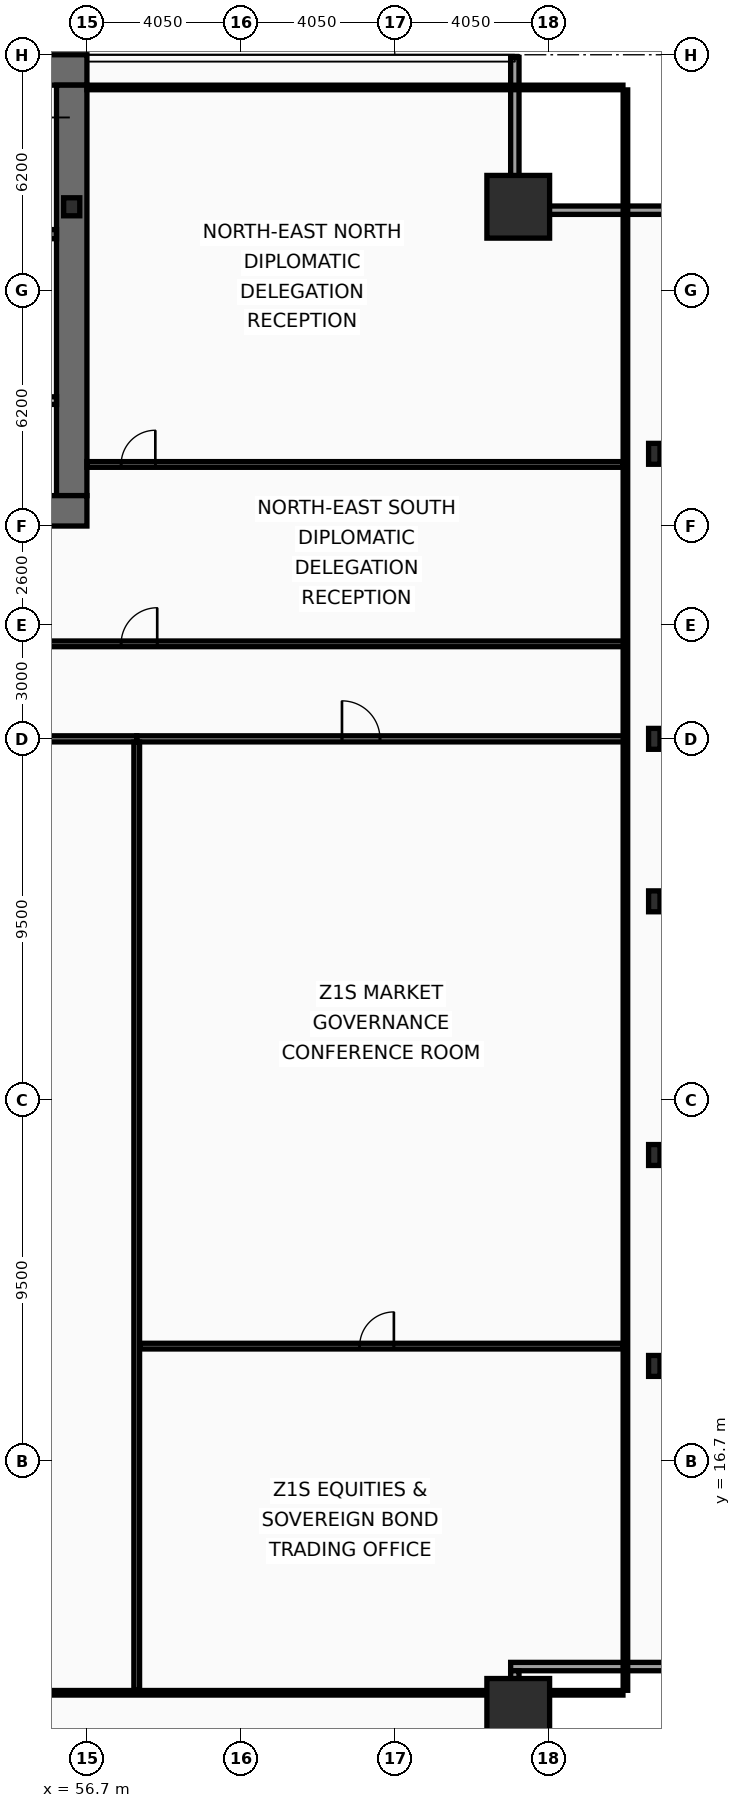
"""IFC4 building model, lengths in metres.
Left out: names, types, materials, properties, quantities, classifications, styles, units other than length and angle.
Written with IfcOpenShell. Run it as: python <this file> out.ifc"""

import sys

from ifc_helpers import new_model, si_unit, direction, frame, frame_2d, origin, origin_2d, place, context, subcontext, project, spatial, rectangle, hollow_rectangle, i_section, extrude, element, fill, save


model = new_model("IFC4")
c1 = context("Model", 3, precision=1e-05, world=origin(), true_north=direction((0.0, 1.0)))
c2 = subcontext(c1, "Body", "Model", "MODEL_VIEW")
j1 = project(units=[si_unit("LENGTHUNIT", "METRE"), si_unit("PLANEANGLEUNIT", "RADIAN")], contexts=[c1])
p1 = place(None, origin())
s1 = spatial("IfcSite", under=j1, at=p1, CompositionType="ELEMENT")
p2 = place(p1, origin())
s2 = spatial("IfcBuilding", under=s1, at=p2, CompositionType="ELEMENT")
p3 = place(p2, frame((0.0, 0.0, 77.8)))
s3 = spatial("IfcBuildingStorey", under=s2, at=p3, CompositionType="ELEMENT", Elevation=77.8)
p4 = place(p3, frame((16.2, 53.3, 0.0), z_axis=(0.0, 0.0, 1.0), x_axis=(1.0, 0.0, 0.0)))
e1 = element("IfcWall", 1, at=p4, inside=s3, PredefinedType="SHEAR", context=c2, shape_type="SweptSolid", body=[
    extrude(rectangle(XDim=40.5, YDim=0.8, at=frame_2d((20.25, 0.0))), origin(), (0.0, 0.0, 1.0), 3.82),
])
p5 = place(p3, frame((56.3, 52.9, 0.0), z_axis=(0.0, 0.0, 1.0), x_axis=(0.0, -1.0, 0.0)))
e2 = element("IfcWall", 2, at=p5, inside=s3, PredefinedType="SHEAR", context=c2, shape_type="SweptSolid", body=[
    extrude(rectangle(XDim=10.8, YDim=0.8, at=frame_2d((5.4, 0.0))), origin(), (0.0, 0.0, 1.0), 3.82),
])
p6 = place(p3, frame((56.7, 41.7, 0.0), z_axis=(0.0, 0.0, 1.0), x_axis=(-1.0, 0.0, 0.0)))
e3 = element("IfcWall", 3, at=p6, inside=s3, PredefinedType="SHEAR", context=c2, shape_type="SweptSolid", body=[
    extrude(rectangle(XDim=2.45, YDim=0.8, at=frame_2d((1.225, 0.0))), origin(), (0.0, 0.0, 1.0), 3.82),
])
p7 = place(p3, frame((48.63, 48.98, 0.0), z_axis=(0.0, 0.0, 1.0), x_axis=(1.0, 0.0, 0.0)))
e4 = element("IfcWall", 4, at=p7, inside=s3, PredefinedType="SHEAR", context=c2, shape_type="SweptSolid", body=[
    extrude(rectangle(XDim=7.27, YDim=0.24, at=frame_2d((3.635, 0.0))), origin(), (0.0, 0.0, 1.0), 3.82),
])
p8 = place(p7, frame((6.0, 0.0, 0.0)))
e5 = element("IfcOpeningElement", 5, at=p8, cuts=e4, PredefinedType="OPENING", context=c2, shape_type="SweptSolid", body=[
    extrude(rectangle(XDim=1.05, YDim=2.15, at=frame_2d((0.525, 1.075))), frame((0.0, 0.13, 0.0), z_axis=(0.0, -1.0, 0.0), x_axis=(1.0, 0.0, 0.0)), (0.0, 0.0, 1.0), 0.26),
])
for number, where, z_axis, x_axis in (
    (6, (68.05, 10.15, 0.0), (0.0, 0.0, 1.0), (1.0, 0.0, 0.0)),
    (7, (68.05, 49.7, 0.0), (0.0, 0.0, 1.0), (1.0, 0.0, 0.0)),
):
    element("IfcColumn", number, at=place(p3, frame(where, z_axis=z_axis, x_axis=x_axis)), inside=s3, PredefinedType="COLUMN", context=c2, shape_type="SweptSolid", body=[
        extrude(hollow_rectangle(XDim=1.65, YDim=1.65, WallThickness=0.075, at=origin_2d()), origin(), (0.0, 0.0, 1.0), 4.0),
    ])
for number, where, z_axis, x_axis in (
    (8, (71.63, 19.2, 0.0), (0.0, 0.0, 1.0), (1.0, 0.0, 0.0)),
    (9, (71.63, 24.75, 0.0), (0.0, 0.0, 1.0), (1.0, 0.0, 0.0)),
    (10, (71.63, 31.425, 0.0), (0.0, 0.0, 1.0), (1.0, 0.0, 0.0)),
    (11, (71.63, 35.7, 0.0), (0.0, 0.0, 1.0), (1.0, 0.0, 0.0)),
    (12, (71.63, 43.2, 0.0), (0.0, 0.0, 1.0), (1.0, 0.0, 0.0)),
):
    element("IfcColumn", number, at=place(p3, frame(where, z_axis=z_axis, x_axis=x_axis)), inside=s3, PredefinedType="COLUMN", context=c2, shape_type="SweptSolid", body=[
        extrude(i_section(OverallWidth=0.3, OverallDepth=0.55, WebThickness=0.015, FlangeThickness=0.029, at=origin_2d()), origin(), (0.0, 0.0, 1.0), 4.0),
    ])
p9 = place(p3, frame((56.3, 49.7, 0.0), z_axis=(0.0, 0.0, 1.0), x_axis=(1.0, 0.0, 0.0)))
e13 = element("IfcColumn", 13, at=p9, inside=s3, PredefinedType="COLUMN", context=c2, shape_type="SweptSolid", body=[
    extrude(i_section(OverallWidth=0.424, OverallDepth=0.474, WebThickness=0.048, FlangeThickness=0.077, at=origin_2d()), origin(), (0.0, 0.0, 1.0), 4.0),
])
p10 = place(p3, frame((67.96, 53.63, 0.0), z_axis=(0.0, 0.0, 1.0), x_axis=(0.0, -1.0, 0.0)))
e14 = element("IfcWall", 14, at=p10, inside=s3, PredefinedType="SOLIDWALL", context=c2, shape_type="SweptSolid", body=[
    extrude(rectangle(XDim=3.91, YDim=0.22, at=frame_2d((1.955, 0.0))), origin(), (0.0, 0.0, 1.0), 2.47),
])
p11 = place(p3, frame((67.85, 49.61, 0.0), z_axis=(0.0, 0.0, 1.0), x_axis=(1.0, 0.0, 0.0)))
e15 = element("IfcWall", 15, at=p11, inside=s3, PredefinedType="SOLIDWALL", context=c2, shape_type="SweptSolid", body=[
    extrude(rectangle(XDim=4.13, YDim=0.22, at=frame_2d((2.065, 0.0))), origin(), (0.0, 0.0, 1.0), 2.47),
])
p12 = place(p3, frame((71.98, 11.29, 0.0), z_axis=(0.0, 0.0, 1.0), x_axis=(-1.0, 0.0, 0.0)))
e16 = element("IfcWall", 16, at=p12, inside=s3, PredefinedType="SOLIDWALL", context=c2, shape_type="SweptSolid", body=[
    extrude(rectangle(XDim=4.13, YDim=0.22, at=frame_2d((2.065, 0.0))), origin(), (0.0, 0.0, 1.0), 3.16),
])
p13 = place(p3, frame((67.96, 11.18, 0.0), z_axis=(0.0, 0.0, 1.0), x_axis=(0.0, -1.0, 0.0)))
e17 = element("IfcWall", 17, at=p13, inside=s3, PredefinedType="SOLIDWALL", context=c2, shape_type="SweptSolid", body=[
    extrude(rectangle(XDim=3.91, YDim=0.22, at=frame_2d((1.955, 0.0))), origin(), (0.0, 0.0, 1.0), 2.47),
])
p14 = place(p3, frame((51.9, 44.6, 0.0), z_axis=(0.0, 0.0, 1.0), x_axis=(1.0, 0.0, 0.0)))
e18 = element("IfcWall", 18, at=p14, inside=s3, PredefinedType="PARTITIONING", context=c2, shape_type="SweptSolid", body=[
    extrude(rectangle(XDim=4.0, YDim=0.2, at=frame_2d((2.0, 0.0))), origin(), (0.0, 0.0, 1.0), 3.82),
])
p15 = place(p14, frame((1.15, 0.0, 0.0)))
e19 = element("IfcOpeningElement", 19, at=p15, cuts=e18, PredefinedType="OPENING", context=c2, shape_type="SweptSolid", body=[
    extrude(rectangle(XDim=1.05, YDim=2.15, at=frame_2d((0.525, 1.075))), frame((0.0, 0.11, 0.0), z_axis=(0.0, -1.0, 0.0), x_axis=(1.0, 0.0, 0.0)), (0.0, 0.0, 1.0), 0.22),
])
p16 = place(p3, frame((54.35, 38.2, 0.0), z_axis=(0.0, 0.0, 1.0), x_axis=(1.0, 0.0, 0.0)))
e20 = element("IfcWall", 20, at=p16, inside=s3, PredefinedType="PARTITIONING", context=c2, shape_type="SweptSolid", body=[
    extrude(rectangle(XDim=16.52, YDim=0.15, at=frame_2d((8.26, 0.0))), origin(), (0.0, 0.0, 1.0), 3.01),
])
p17 = place(p16, frame((3.25, 0.0, 0.0)))
e21 = element("IfcOpeningElement", 21, at=p17, cuts=e20, PredefinedType="OPENING", context=c2, shape_type="SweptSolid", body=[
    extrude(rectangle(XDim=0.95, YDim=2.05, at=frame_2d((0.475, 1.025))), frame((0.0, 0.085, 0.0), z_axis=(0.0, -1.0, 0.0), x_axis=(1.0, 0.0, 0.0)), (0.0, 0.0, 1.0), 0.17),
])
p18 = place(p3, frame((56.7, 42.92, 0.0), z_axis=(0.0, 0.0, 1.0), x_axis=(1.0, 0.0, 0.0)))
e22 = element("IfcWall", 22, at=p18, inside=s3, PredefinedType="PARTITIONING", context=c2, shape_type="SweptSolid", body=[
    extrude(rectangle(XDim=14.105, YDim=0.15, at=frame_2d((7.052, 0.0))), origin(), (0.0, 0.0, 1.0), 2.47),
])
p19 = place(p18, frame((0.9, 0.0, 0.0)))
e23 = element("IfcOpeningElement", 23, at=p19, cuts=e22, PredefinedType="OPENING", context=c2, shape_type="SweptSolid", body=[
    extrude(rectangle(XDim=0.9, YDim=2.05, at=frame_2d((0.45, 1.025))), frame((0.0, 0.085, 0.0), z_axis=(0.0, -1.0, 0.0), x_axis=(1.0, 0.0, 0.0)), (0.0, 0.0, 1.0), 0.17),
])
p20 = place(p3, frame((48.18, 35.7, 0.0), z_axis=(0.0, 0.0, 1.0), x_axis=(1.0, 0.0, 0.0)))
e24 = element("IfcWall", 24, at=p20, inside=s3, PredefinedType="PARTITIONING", context=c2, shape_type="SweptSolid", body=[
    extrude(rectangle(XDim=9.83, YDim=0.16, at=frame_2d((4.915, 0.0))), origin(), (0.0, 0.0, 1.0), 2.21),
])
p21 = place(p20, frame((4.129, 0.0, 0.0)))
e25 = element("IfcOpeningElement", 25, at=p21, cuts=e24, PredefinedType="OPENING", context=c2, shape_type="SweptSolid", body=[
    extrude(rectangle(XDim=1.0, YDim=2.05, at=frame_2d((0.5, 1.025))), frame((0.0, 0.09, 0.0), z_axis=(0.0, -1.0, 0.0), x_axis=(1.0, 0.0, 0.0)), (0.0, 0.0, 1.0), 0.18),
])
p22 = place(p3, frame((58.011, 35.7, 0.0), z_axis=(0.0, 0.0, 1.0), x_axis=(1.0, 0.0, 0.0)))
e26 = element("IfcWall", 26, at=p22, inside=s3, PredefinedType="PARTITIONING", context=c2, shape_type="SweptSolid", body=[
    extrude(rectangle(XDim=12.859, YDim=0.16, at=frame_2d((6.43, 0.0))), origin(), (0.0, 0.0, 1.0), 2.21),
])
p23 = place(p22, frame((5.401, 0.0, 0.0)))
e27 = element("IfcOpeningElement", 27, at=p23, cuts=e26, PredefinedType="OPENING", context=c2, shape_type="SweptSolid", body=[
    extrude(rectangle(XDim=1.0, YDim=2.05, at=frame_2d((0.5, 1.025))), frame((0.0, 0.09, 0.0), z_axis=(0.0, -1.0, 0.0), x_axis=(1.0, 0.0, 0.0)), (0.0, 0.0, 1.0), 0.18),
])
p24 = place(p3, frame((58.011, 10.665, 0.0), z_axis=(0.0, 0.0, 1.0), x_axis=(0.0, 1.0, 0.0)))
e28 = element("IfcWall", 28, at=p24, inside=s3, PredefinedType="PARTITIONING", context=c2, shape_type="SweptSolid", body=[
    extrude(rectangle(XDim=24.95, YDim=0.15, at=frame_2d((12.475, 0.0))), origin(), (0.0, 0.0, 1.0), 2.21),
])
p25 = place(p3, frame((58.091, 19.721, 0.0), z_axis=(0.0, 0.0, 1.0), x_axis=(1.0, 0.0, 0.0)))
e29 = element("IfcWall", 29, at=p25, inside=s3, PredefinedType="PARTITIONING", context=c2, shape_type="SweptSolid", body=[
    extrude(rectangle(XDim=12.714, YDim=0.15, at=frame_2d((6.357, 0.0))), origin(), (0.0, 0.0, 1.0), 2.21),
])
p26 = place(p25, frame((5.787, 0.0, 0.0)))
e30 = element("IfcOpeningElement", 30, at=p26, cuts=e29, PredefinedType="OPENING", context=c2, shape_type="SweptSolid", body=[
    extrude(rectangle(XDim=0.9, YDim=2.05, at=frame_2d((0.45, 1.025))), frame((0.0, 0.085, 0.0), z_axis=(0.0, -1.0, 0.0), x_axis=(1.0, 0.0, 0.0)), (0.0, 0.0, 1.0), 0.17),
])
p27 = place(p3, frame((70.87, 10.665, 0.0), z_axis=(0.0, 0.0, 1.0), x_axis=(0.0, 1.0, 0.0)))
e31 = element("IfcWall", 31, at=p27, inside=s3, PredefinedType="PARTITIONING", context=c2, shape_type="SweptSolid", body=[
    extrude(rectangle(XDim=42.11, YDim=0.12, at=frame_2d((21.055, 0.0))), origin(), (0.0, 0.0, 1.0), 2.21),
])
p28 = place(p3, frame((56.7, 52.84, 0.0), z_axis=(0.0, 0.0, 1.0), x_axis=(1.0, 0.0, 0.0)))
e32 = element("IfcWall", 32, at=p28, inside=s3, PredefinedType="PARTITIONING", context=c2, shape_type="SweptSolid", body=[
    extrude(rectangle(XDim=14.105, YDim=0.12, at=frame_2d((7.052, 0.0))), origin(), (0.0, 0.0, 1.0), 3.82),
])
p29 = place(p3, frame((2.095, 10.6, 0.0), z_axis=(0.0, 0.0, 1.0), x_axis=(1.0, 0.0, 0.0)))
e33 = element("IfcWall", 33, at=p29, inside=s3, PredefinedType="PARTITIONING", context=c2, shape_type="SweptSolid", body=[
    extrude(rectangle(XDim=68.71, YDim=0.12, at=frame_2d((34.355, 0.0))), origin(), (0.0, 0.0, 1.0), 2.47),
])
p30 = place(p17, origin())
e34 = element("IfcDoor", 34, at=p30, inside=s3, OperationType="SINGLE_SWING_RIGHT", PredefinedType="DOOR", context=c2, shape_type="SweptSolid", body=[
    extrude(rectangle(XDim=0.95, YDim=2.05, at=frame_2d((0.475, 1.025))), frame((0.0, 0.025, 0.0), z_axis=(0.0, -1.0, 0.0), x_axis=(1.0, 0.0, 0.0)), (0.0, 0.0, 1.0), 0.05),
])
fill(e21, e34)
p31 = place(p19, origin())
e35 = element("IfcDoor", 35, at=p31, inside=s3, OperationType="SINGLE_SWING_RIGHT", PredefinedType="DOOR", context=c2, shape_type="SweptSolid", body=[
    extrude(rectangle(XDim=0.9, YDim=2.05, at=frame_2d((0.45, 1.025))), frame((0.0, 0.025, 0.0), z_axis=(0.0, -1.0, 0.0), x_axis=(1.0, 0.0, 0.0)), (0.0, 0.0, 1.0), 0.05),
])
fill(e23, e35)
p32 = place(p23, origin())
e36 = element("IfcDoor", 36, at=p32, inside=s3, OperationType="SINGLE_SWING_LEFT", PredefinedType="DOOR", context=c2, shape_type="SweptSolid", body=[
    extrude(rectangle(XDim=1.0, YDim=2.05, at=frame_2d((0.5, 1.025))), frame((0.0, 0.025, 0.0), z_axis=(0.0, -1.0, 0.0), x_axis=(1.0, 0.0, 0.0)), (0.0, 0.0, 1.0), 0.05),
])
fill(e27, e36)
p33 = place(p26, origin())
e37 = element("IfcDoor", 37, at=p33, inside=s3, OperationType="SINGLE_SWING_RIGHT", PredefinedType="DOOR", context=c2, shape_type="SweptSolid", body=[
    extrude(rectangle(XDim=0.9, YDim=2.05, at=frame_2d((0.45, 1.025))), frame((0.0, 0.025, 0.0), z_axis=(0.0, -1.0, 0.0), x_axis=(1.0, 0.0, 0.0)), (0.0, 0.0, 1.0), 0.05),
])
fill(e30, e37)
save(model, sys.argv[1])
